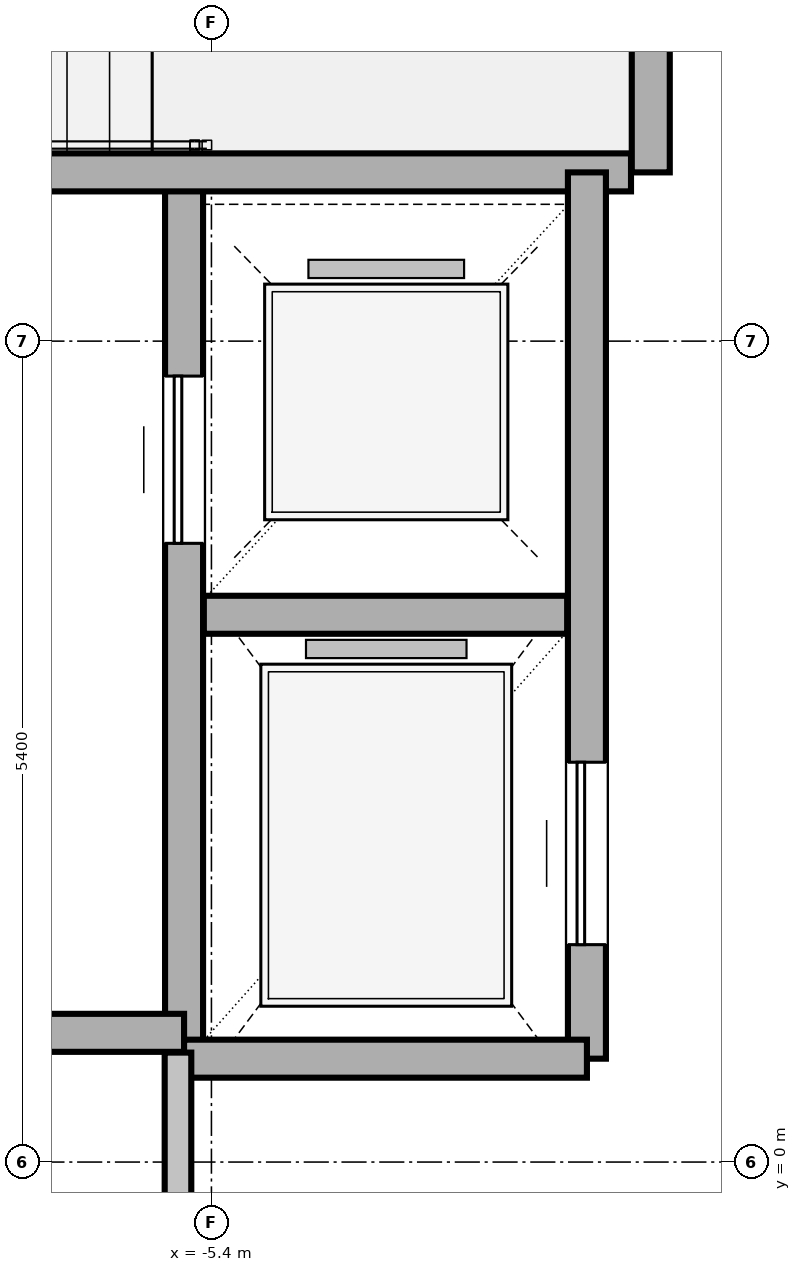
"""IFC4 building model, lengths in metres.
Left out: names, types, materials, properties, quantities, classifications, styles, units other than length and angle.
Written with IfcOpenShell. Run it as: python <this file> out.ifc"""

import sys

from ifc_helpers import new_model, si_unit, direction, frame, frame_2d, origin, place, context, subcontext, project, spatial, rectangle, extrude, element, fill, save


model = new_model("IFC4")
c1 = context("Model", 3, precision=1e-05, world=origin(), true_north=direction((0.0, 1.0)))
c2 = subcontext(c1, "Body", "Model", "MODEL_VIEW")
j1 = project(units=[si_unit("LENGTHUNIT", "METRE"), si_unit("PLANEANGLEUNIT", "RADIAN")], contexts=[c1])
p1 = place(None, origin())
s1 = spatial("IfcSite", under=j1, at=p1, CompositionType="ELEMENT")
p2 = place(p1, origin())
s2 = spatial("IfcBuilding", under=s1, at=p2, CompositionType="ELEMENT")
p3 = place(p2, frame((0.0, 0.0, 258.75)))
s3 = spatial("IfcBuildingStorey", under=s2, at=p3, CompositionType="ELEMENT", Elevation=258.75)
p4 = place(p3, frame((-5.58, 0.72, 0.0), z_axis=(0.0, 0.0, 1.0), x_axis=(0.0, 1.0, 0.0)))
e1 = element("IfcWall", 1, at=p4, inside=s3, PredefinedType="SHEAR", context=c2, shape_type="SweptSolid", body=[
    extrude(rectangle(XDim=5.79, YDim=0.25, at=frame_2d((2.895, 0.0))), origin(), (0.0, 0.0, 1.0), 3.75),
])
p5 = place(p4, frame((3.35, 0.0, 0.0)))
e2 = element("IfcOpeningElement", 2, at=p5, cuts=e1, PredefinedType="OPENING", context=c2, shape_type="SweptSolid", body=[
    extrude(rectangle(XDim=1.1, YDim=2.1, at=frame_2d((0.55, 1.05))), frame((0.0, 0.135, 0.0), z_axis=(0.0, -1.0, 0.0), x_axis=(1.0, 0.0, 0.0)), (0.0, 0.0, 1.0), 0.27),
])
p6 = place(p3, frame((-10.34, 0.85, 0.0), z_axis=(0.0, 0.0, 1.0), x_axis=(1.0, 0.0, 0.0)))
e3 = element("IfcWall", 3, at=p6, inside=s3, PredefinedType="SHEAR", context=c2, shape_type="SweptSolid", body=[
    extrude(rectangle(XDim=4.76, YDim=0.25, at=frame_2d((2.38, 0.0))), origin(), (0.0, 0.0, 1.0), 3.75),
])
p7 = place(p6, frame((1.2, 0.0, 0.0)))
e4 = element("IfcOpeningElement", 4, at=p7, cuts=e3, PredefinedType="OPENING", context=c2, shape_type="SweptSolid", body=[
    extrude(rectangle(XDim=0.85, YDim=2.1, at=frame_2d((0.425, 1.05))), frame((0.0, 0.135, 0.0), z_axis=(0.0, -1.0, 0.0), x_axis=(1.0, 0.0, 0.0)), (0.0, 0.0, 1.0), 0.27),
])
p8 = place(p3, frame((-2.51, 6.51, 0.0), z_axis=(0.0, 0.0, 1.0), x_axis=(0.0, 1.0, 0.0)))
e5 = element("IfcWall", 5, at=p8, inside=s3, PredefinedType="SHEAR", context=c2, shape_type="SweptSolid", body=[
    extrude(rectangle(XDim=4.04, YDim=0.25, at=frame_2d((2.02, 0.0))), origin(), (0.0, 0.0, 1.0), 3.75),
])
p9 = place(p3, frame((-10.34, 6.51, 0.0), z_axis=(0.0, 0.0, 1.0), x_axis=(1.0, 0.0, 0.0)))
e6 = element("IfcWall", 6, at=p9, inside=s3, PredefinedType="SHEAR", context=c2, shape_type="SweptSolid", body=[
    extrude(rectangle(XDim=7.7, YDim=0.25, at=frame_2d((3.85, 0.0))), origin(), (0.0, 0.0, 1.0), 3.75),
])
p10 = place(p9, frame((0.35, 0.0, 0.0)))
e7 = element("IfcOpeningElement", 7, at=p10, cuts=e6, PredefinedType="OPENING", context=c2, shape_type="SweptSolid", body=[
    extrude(rectangle(XDim=1.1, YDim=2.1, at=frame_2d((0.55, 1.05))), frame((0.0, 0.135, 0.0), z_axis=(0.0, -1.0, 0.0), x_axis=(1.0, 0.0, 0.0)), (0.0, 0.0, 1.0), 0.27),
])
p11 = place(p3, frame((-2.93, 0.68, 0.0), z_axis=(0.0, 0.0, 1.0), x_axis=(0.0, 1.0, 0.0)))
e8 = element("IfcWall", 8, at=p11, inside=s3, PredefinedType="SHEAR", context=c2, shape_type="SweptSolid", body=[
    extrude(rectangle(XDim=5.83, YDim=0.25, at=frame_2d((2.915, 0.0))), origin(), (0.0, 0.0, 1.0), 3.75),
])
p12 = place(p11, frame((0.75, 0.0, 0.0)))
e9 = element("IfcOpeningElement", 9, at=p12, cuts=e8, PredefinedType="OPENING", context=c2, shape_type="SweptSolid", body=[
    extrude(rectangle(XDim=1.2, YDim=2.1, at=frame_2d((0.6, 1.05))), frame((0.0, 0.135, 0.0), z_axis=(0.0, -1.0, 0.0), x_axis=(1.0, 0.0, 0.0)), (0.0, 0.0, 1.0), 0.27),
])
p13 = place(p3, frame((-5.45, 3.6, 0.0), z_axis=(0.0, 0.0, 1.0), x_axis=(1.0, 0.0, 0.0)))
e10 = element("IfcWall", 10, at=p13, inside=s3, PredefinedType="SHEAR", context=c2, shape_type="SweptSolid", body=[
    extrude(rectangle(XDim=2.39, YDim=0.25, at=frame_2d((1.195, 0.0))), origin(), (0.0, 0.0, 1.0), 3.75),
])
p14 = place(p3, frame((-5.58, 0.68, 0.0), z_axis=(0.0, 0.0, 1.0), x_axis=(1.0, 0.0, 0.0)))
e11 = element("IfcWall", 11, at=p14, inside=s3, PredefinedType="SHEAR", context=c2, shape_type="SweptSolid", body=[
    extrude(rectangle(XDim=2.65, YDim=0.25, at=frame_2d((1.325, 0.0))), origin(), (0.0, 0.0, 1.0), 3.75),
])
p15 = place(p3, frame((-5.62, -1.42, 0.0), z_axis=(0.0, 0.0, 1.0), x_axis=(0.0, 1.0, 0.0)))
e12 = element("IfcWall", 12, at=p15, inside=s3, PredefinedType="PARTITIONING", context=c2, shape_type="SweptSolid", body=[
    extrude(rectangle(XDim=2.14, YDim=0.175, at=frame_2d((1.07, 0.0))), origin(), (0.0, 0.0, 1.0), 3.57),
])
p16 = place(p5, origin())
e13 = element("IfcDoor", 13, at=p16, inside=s3, OperationType="SLIDING_TO_LEFT", PredefinedType="DOOR", context=c2, shape_type="SweptSolid", body=[
    extrude(rectangle(XDim=1.1, YDim=2.1, at=frame_2d((0.55, 1.05))), frame((0.0, 0.025, 0.0), z_axis=(0.0, -1.0, 0.0), x_axis=(1.0, 0.0, 0.0)), (0.0, 0.0, 1.0), 0.05),
])
fill(e2, e13)
p17 = place(p12, origin())
e14 = element("IfcDoor", 14, at=p17, inside=s3, OperationType="SLIDING_TO_LEFT", PredefinedType="DOOR", context=c2, shape_type="SweptSolid", body=[
    extrude(rectangle(XDim=1.2, YDim=2.1, at=frame_2d((0.6, 1.05))), frame((0.0, 0.025, 0.0), z_axis=(0.0, -1.0, 0.0), x_axis=(1.0, 0.0, 0.0)), (0.0, 0.0, 1.0), 0.05),
])
fill(e9, e14)
save(model, sys.argv[1])
